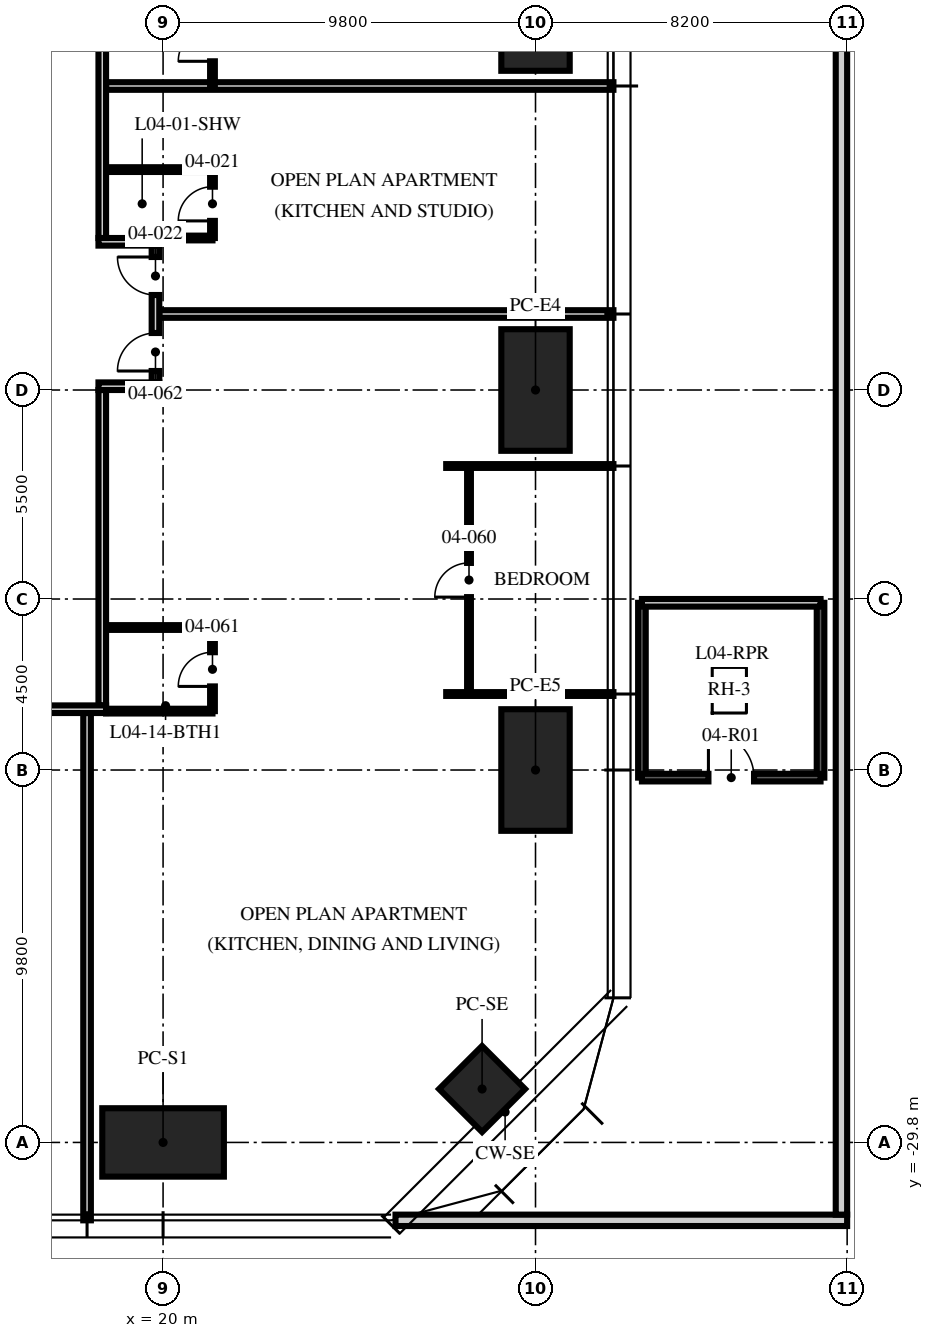
"""IFC4 building model, lengths in metres.
Left out: names, types, materials, properties, quantities, classifications, styles, units other than length and angle.
Written with IfcOpenShell. Run it as: python <this file> out.ifc"""

import sys

from ifc_helpers import new_model, si_unit, direction, frame, frame_2d, origin, origin_2d, place, context, subcontext, project, spatial, rectangle, hollow_rectangle, extrude, element, fill, save


model = new_model("IFC4")
c1 = context("Model", 3, precision=1e-05, world=origin(), true_north=direction((0.0, 1.0)))
c2 = subcontext(c1, "Body", "Model", "MODEL_VIEW")
j1 = project(units=[si_unit("LENGTHUNIT", "METRE"), si_unit("PLANEANGLEUNIT", "RADIAN")], contexts=[c1])
p1 = place(None, origin())
s1 = spatial("IfcSite", under=j1, at=p1, CompositionType="ELEMENT")
p2 = place(p1, origin())
s2 = spatial("IfcBuilding", under=s1, at=p2, CompositionType="ELEMENT")
p3 = place(p2, frame((0.0, 0.0, 21.0)))
s3 = spatial("IfcBuildingStorey", under=s2, at=p3, CompositionType="ELEMENT", Elevation=21.0)
for number, where, z_axis, x_axis in (
    (1, (29.8, 0.0, 0.0), (0.0, 0.0, 1.0), (0.0, 1.0, 0.0)),
    (2, (29.8, -10.0, 0.0), (0.0, 0.0, 1.0), (0.0, 1.0, 0.0)),
    (3, (29.8, -20.0, 0.0), (0.0, 0.0, 1.0), (0.0, 1.0, 0.0)),
    (4, (20.0, -29.8, 0.0), (0.0, 0.0, 1.0), (1.0, 0.0, 0.0)),
):
    element("IfcColumn", number, at=place(p3, frame(where, z_axis=z_axis, x_axis=x_axis)), inside=s3, PredefinedType="COLUMN", context=c2, shape_type="SweptSolid", body=[
        extrude(hollow_rectangle(XDim=3.2, YDim=1.8, WallThickness=0.2, at=origin_2d()), origin(), (0.0, 0.0, 1.0), 3.75),
    ])
p4 = place(p3, frame((28.394, -28.394, 0.0), z_axis=(0.0, 0.0, 1.0), x_axis=(0.707106781187, 0.707106781187, 0.0)))
e5 = element("IfcColumn", 5, at=p4, inside=s3, PredefinedType="COLUMN", context=c2, shape_type="SweptSolid", body=[
    extrude(hollow_rectangle(XDim=1.6, YDim=1.6, WallThickness=0.1, at=origin_2d()), origin(), (0.0, 0.0, 1.0), 3.75),
])
p5 = place(p3, frame((26.116, -31.85, 0.0), z_axis=(0.0, 0.0, 1.0), x_axis=(1.0, 0.0, 0.0)))
e6 = element("IfcWall", 6, at=p5, inside=s3, PredefinedType="PARAPET", context=c2, shape_type="SweptSolid", body=[
    extrude(rectangle(XDim=11.884, YDim=0.3, at=frame_2d((5.942, 0.0))), origin(), (0.0, 0.0, 1.0), 1.2),
])
p6 = place(p3, frame((37.85, -31.7, 0.0), z_axis=(0.0, 0.0, 1.0), x_axis=(0.0, 1.0, 0.0)))
e7 = element("IfcWall", 7, at=p6, inside=s3, PredefinedType="PARAPET", context=c2, shape_type="SweptSolid", body=[
    extrude(rectangle(XDim=75.4, YDim=0.3, at=frame_2d((37.7, 0.0))), origin(), (0.0, 0.0, 1.0), 1.2),
])
for number, where, z_axis, x_axis in (
    (8, (37.3, -20.2, 0.0), (0.0, 0.0, 1.0), (0.0, 1.0, 0.0)),
    (9, (32.6, -15.6, 0.0), (0.0, 0.0, 1.0), (0.0, -1.0, 0.0)),
):
    element("IfcWall", number, at=place(p3, frame(where, z_axis=z_axis, x_axis=x_axis)), inside=s3, PredefinedType="SOLIDWALL", context=c2, shape_type="SweptSolid", body=[
        extrude(rectangle(XDim=4.6, YDim=0.2, at=frame_2d((2.3, 0.0))), origin(), (0.0, 0.0, 1.0), 3.5),
    ])
p7 = place(p3, frame((19.9, -8.0, 0.0), z_axis=(0.0, 0.0, 1.0), x_axis=(1.0, 0.0, 0.0)))
e10 = element("IfcWall", 10, at=p7, inside=s3, PredefinedType="PARTITIONING", context=c2, shape_type="SweptSolid", body=[
    extrude(rectangle(XDim=11.95, YDim=0.2, at=frame_2d((5.975, 0.0))), origin(), (0.0, 0.0, 1.0), 2.71),
])
p8 = place(p3, frame((18.5, -2.0, 0.0), z_axis=(0.0, 0.0, 1.0), x_axis=(1.0, 0.0, 0.0)))
e11 = element("IfcWall", 11, at=p8, inside=s3, PredefinedType="PARTITIONING", context=c2, shape_type="SweptSolid", body=[
    extrude(rectangle(XDim=13.35, YDim=0.2, at=frame_2d((6.675, 0.0))), origin(), (0.0, 0.0, 1.0), 2.71),
])
p9 = place(p3, frame((18.0, -18.5, 0.0), z_axis=(0.0, 0.0, 1.0), x_axis=(0.0, -1.0, 0.0)))
e12 = element("IfcWall", 12, at=p9, inside=s3, PredefinedType="PARTITIONING", context=c2, shape_type="SweptSolid", body=[
    extrude(rectangle(XDim=13.35, YDim=0.2, at=frame_2d((6.675, 0.0))), origin(), (0.0, 0.0, 1.0), 2.3),
])
for number, where, z_axis, x_axis in (
    (13, (27.45, -18.0, 0.0), (0.0, 0.0, 1.0), (1.0, 0.0, 0.0)),
    (14, (27.45, -12.0, 0.0), (0.0, 0.0, 1.0), (1.0, 0.0, 0.0)),
):
    element("IfcWall", number, at=place(p3, frame(where, z_axis=z_axis, x_axis=x_axis)), inside=s3, PredefinedType="PARTITIONING", context=c2, shape_type="SweptSolid", body=[
        extrude(rectangle(XDim=4.4, YDim=0.1, at=frame_2d((2.2, 0.0))), origin(), (0.0, 0.0, 1.0), 2.71),
    ])
p10 = place(p3, frame((21.3, -6.0, 0.0), z_axis=(0.0, 0.0, 1.0), x_axis=(0.0, 1.0, 0.0)))
e15 = element("IfcWall", 15, at=p10, inside=s3, PredefinedType="PARTITIONING", context=c2, shape_type="SweptSolid", body=[
    extrude(rectangle(XDim=1.8, YDim=0.125, at=frame_2d((0.9, 0.0))), origin(), (0.0, 0.0, 1.0), 2.61),
])
p11 = place(p10, frame((0.45, 0.0, 0.0)))
e16 = element("IfcOpeningElement", 16, at=p11, cuts=e15, PredefinedType="OPENING", context=c2, shape_type="SweptSolid", body=[
    extrude(rectangle(XDim=0.9, YDim=2.1, at=frame_2d((0.45, 1.05))), frame((0.0, 0.073, 0.0), z_axis=(0.0, -1.0, 0.0), x_axis=(1.0, 0.0, 0.0)), (0.0, 0.0, 1.0), 0.145),
])
p12 = place(p3, frame((19.97, -6.0, 0.0), z_axis=(0.0, 0.0, 1.0), x_axis=(1.0, 0.0, 0.0)))
e17 = element("IfcWall", 17, at=p12, inside=s3, PredefinedType="PARTITIONING", context=c2, shape_type="SweptSolid", body=[
    extrude(rectangle(XDim=1.33, YDim=0.125, at=frame_2d((0.665, 0.0))), origin(), (0.0, 0.0, 1.0), 3.5),
])
p13 = place(p3, frame((18.5, -4.2, 0.0), z_axis=(0.0, 0.0, 1.0), x_axis=(1.0, 0.0, 0.0)))
e18 = element("IfcWall", 18, at=p13, inside=s3, PredefinedType="PARTITIONING", context=c2, shape_type="SweptSolid", body=[
    extrude(rectangle(XDim=2.8, YDim=0.125, at=frame_2d((1.4, 0.0))), origin(), (0.0, 0.0, 1.0), 3.5),
])
p14 = place(p3, frame((21.3, -2.0, 0.0), z_axis=(0.0, 0.0, 1.0), x_axis=(0.0, 1.0, 0.0)))
e19 = element("IfcWall", 19, at=p14, inside=s3, PredefinedType="PARTITIONING", context=c2, shape_type="SweptSolid", body=[
    extrude(rectangle(XDim=4.4, YDim=0.125, at=frame_2d((2.2, 0.0))), origin(), (0.0, 0.0, 1.0), 2.492),
])
p15 = place(p14, frame((0.65, 0.0, 0.0)))
e20 = element("IfcOpeningElement", 20, at=p15, cuts=e19, PredefinedType="OPENING", context=c2, shape_type="SweptSolid", body=[
    extrude(rectangle(XDim=0.9, YDim=2.1, at=frame_2d((0.45, 1.05))), frame((0.0, 0.073, 0.0), z_axis=(0.0, -1.0, 0.0), x_axis=(1.0, 0.0, 0.0)), (0.0, 0.0, 1.0), 0.145),
])
p16 = place(p14, frame((2.85, 0.0, 0.0)))
e21 = element("IfcOpeningElement", 21, at=p16, cuts=e19, PredefinedType="OPENING", context=c2, shape_type="SweptSolid", body=[
    extrude(rectangle(XDim=0.9, YDim=2.1, at=frame_2d((0.45, 1.05))), frame((0.0, 0.073, 0.0), z_axis=(0.0, -1.0, 0.0), x_axis=(1.0, 0.0, 0.0)), (0.0, 0.0, 1.0), 0.145),
])
p17 = place(p3, frame((28.05, -18.0, 0.0), z_axis=(0.0, 0.0, 1.0), x_axis=(0.0, 1.0, 0.0)))
e22 = element("IfcWall", 22, at=p17, inside=s3, PredefinedType="PARTITIONING", context=c2, shape_type="SweptSolid", body=[
    extrude(rectangle(XDim=6.0, YDim=0.1, at=frame_2d((3.0, 0.0))), origin(), (0.0, 0.0, 1.0), 2.61),
])
p18 = place(p17, frame((2.55, 0.0, 0.0)))
e23 = element("IfcOpeningElement", 23, at=p18, cuts=e22, PredefinedType="OPENING", context=c2, shape_type="SweptSolid", body=[
    extrude(rectangle(XDim=0.9, YDim=2.1, at=frame_2d((0.45, 1.05))), frame((0.0, 0.06, 0.0), z_axis=(0.0, -1.0, 0.0), x_axis=(1.0, 0.0, 0.0)), (0.0, 0.0, 1.0), 0.12),
])
p19 = place(p3, frame((21.3, -18.45, 0.0), z_axis=(0.0, 0.0, 1.0), x_axis=(0.0, 1.0, 0.0)))
e24 = element("IfcWall", 24, at=p19, inside=s3, PredefinedType="PARTITIONING", context=c2, shape_type="SweptSolid", body=[
    extrude(rectangle(XDim=2.2, YDim=0.125, at=frame_2d((1.1, 0.0))), origin(), (0.0, 0.0, 1.0), 3.5),
])
p20 = place(p19, frame((0.65, 0.0, 0.0)))
e25 = element("IfcOpeningElement", 25, at=p20, cuts=e24, PredefinedType="OPENING", context=c2, shape_type="SweptSolid", body=[
    extrude(rectangle(XDim=0.9, YDim=2.1, at=frame_2d((0.45, 1.05))), frame((0.0, 0.073, 0.0), z_axis=(0.0, -1.0, 0.0), x_axis=(1.0, 0.0, 0.0)), (0.0, 0.0, 1.0), 0.145),
])
p21 = place(p3, frame((18.5, -18.45, 0.0), z_axis=(0.0, 0.0, 1.0), x_axis=(1.0, 0.0, 0.0)))
e26 = element("IfcWall", 26, at=p21, inside=s3, PredefinedType="PARTITIONING", context=c2, shape_type="SweptSolid", body=[
    extrude(rectangle(XDim=2.8, YDim=0.125, at=frame_2d((1.4, 0.0))), origin(), (0.0, 0.0, 1.0), 2.3),
])
p22 = place(p3, frame((18.5, -16.25, 0.0), z_axis=(0.0, 0.0, 1.0), x_axis=(1.0, 0.0, 0.0)))
e27 = element("IfcWall", 27, at=p22, inside=s3, PredefinedType="PARTITIONING", context=c2, shape_type="SweptSolid", body=[
    extrude(rectangle(XDim=2.8, YDim=0.125, at=frame_2d((1.4, 0.0))), origin(), (0.0, 0.0, 1.0), 3.5),
])
p23 = place(p3, frame((18.4, -18.3, 0.0), z_axis=(0.0, 0.0, 1.0), x_axis=(0.0, 1.0, 0.0)))
e28 = element("IfcWall", 28, at=p23, inside=s3, PredefinedType="PARTITIONING", context=c2, shape_type="SweptSolid", body=[
    extrude(rectangle(XDim=8.3, YDim=0.2, at=frame_2d((4.15, 0.0))), origin(), (0.0, 0.0, 1.0), 2.3),
])
p24 = place(p3, frame((18.3, -9.9, 0.0), z_axis=(0.0, 0.0, 1.0), x_axis=(1.0, 0.0, 0.0)))
e29 = element("IfcWall", 29, at=p24, inside=s3, PredefinedType="PARTITIONING", context=c2, shape_type="SweptSolid", body=[
    extrude(rectangle(XDim=1.6, YDim=0.2, at=frame_2d((0.8, 0.0))), origin(), (0.0, 0.0, 1.0), 2.492),
])
p25 = place(p3, frame((18.3, -6.1, 0.0), z_axis=(0.0, 0.0, 1.0), x_axis=(1.0, 0.0, 0.0)))
e30 = element("IfcWall", 30, at=p25, inside=s3, PredefinedType="PARTITIONING", context=c2, shape_type="SweptSolid", body=[
    extrude(rectangle(XDim=1.6, YDim=0.2, at=frame_2d((0.8, 0.0))), origin(), (0.0, 0.0, 1.0), 3.5),
])
p26 = place(p3, frame((19.8, -9.8, 0.0), z_axis=(0.0, 0.0, 1.0), x_axis=(0.0, 1.0, 0.0)))
e31 = element("IfcWall", 31, at=p26, inside=s3, PredefinedType="PARTITIONING", context=c2, shape_type="SweptSolid", body=[
    extrude(rectangle(XDim=3.6, YDim=0.2, at=frame_2d((1.8, 0.0))), origin(), (0.0, 0.0, 1.0), 3.5),
])
p27 = place(p26, frame((2.3, 0.0, 0.0)))
e32 = element("IfcOpeningElement", 32, at=p27, cuts=e31, PredefinedType="OPENING", context=c2, shape_type="SweptSolid", body=[
    extrude(rectangle(XDim=1.0, YDim=2.2, at=frame_2d((0.5, 1.1))), frame((0.0, 0.11, 0.0), z_axis=(0.0, -1.0, 0.0), x_axis=(1.0, 0.0, 0.0)), (0.0, 0.0, 1.0), 0.22),
])
p28 = place(p26, frame((0.3, 0.0, 0.0)))
e33 = element("IfcOpeningElement", 33, at=p28, cuts=e31, PredefinedType="OPENING", context=c2, shape_type="SweptSolid", body=[
    extrude(rectangle(XDim=1.0, YDim=2.2, at=frame_2d((0.5, 1.1))), frame((0.0, 0.11, 0.0), z_axis=(0.0, -1.0, 0.0), x_axis=(1.0, 0.0, 0.0)), (0.0, 0.0, 1.0), 0.22),
])
p29 = place(p3, frame((18.4, -6.0, 0.0), z_axis=(0.0, 0.0, 1.0), x_axis=(0.0, 1.0, 0.0)))
e34 = element("IfcWall", 34, at=p29, inside=s3, PredefinedType="PARTITIONING", context=c2, shape_type="SweptSolid", body=[
    extrude(rectangle(XDim=24.3, YDim=0.2, at=frame_2d((12.15, 0.0))), origin(), (0.0, 0.0, 1.0), 2.3),
])
p30 = place(p3, frame((18.5, -18.4, 0.0), z_axis=(0.0, 0.0, 1.0), x_axis=(-1.0, 0.0, 0.0)))
e35 = element("IfcWall", 35, at=p30, inside=s3, PredefinedType="PARTITIONING", context=c2, shape_type="SweptSolid", body=[
    extrude(rectangle(XDim=4.5, YDim=0.2, at=frame_2d((2.25, 0.0))), origin(), (0.0, 0.0, 1.0), 2.3),
])
p31 = place(p3, frame((32.6, -20.2, 0.0), z_axis=(0.0, 0.0, 1.0), x_axis=(1.0, 0.0, 0.0)))
e36 = element("IfcWall", 36, at=p31, inside=s3, PredefinedType="SOLIDWALL", context=c2, shape_type="SweptSolid", body=[
    extrude(rectangle(XDim=4.7, YDim=0.2, at=frame_2d((2.35, 0.0))), origin(), (0.0, 0.0, 1.0), 3.5),
])
p32 = place(p31, frame((1.75, 0.0, 0.0)))
e37 = element("IfcOpeningElement", 37, at=p32, cuts=e36, PredefinedType="OPENING", context=c2, shape_type="SweptSolid", body=[
    extrude(rectangle(XDim=1.2, YDim=2.1, at=frame_2d((0.6, 1.05))), frame((0.0, 0.11, 0.0), z_axis=(0.0, -1.0, 0.0), x_axis=(1.0, 0.0, 0.0)), (0.0, 0.0, 1.0), 0.22),
])
p33 = place(p3, frame((37.3, -15.6, 0.0), z_axis=(0.0, 0.0, 1.0), x_axis=(-1.0, 0.0, 0.0)))
e38 = element("IfcWall", 38, at=p33, inside=s3, PredefinedType="SOLIDWALL", context=c2, shape_type="SweptSolid", body=[
    extrude(rectangle(XDim=4.7, YDim=0.2, at=frame_2d((2.35, 0.0))), origin(), (0.0, 0.0, 1.0), 3.5),
])
p34 = place(p3, frame((0.0, 0.0, -0.25)))
p35 = place(p34, frame((34.9, -17.9, 0.0)))
p36 = place(p35, frame((0.0, 0.0, 0.25)))
e39 = element("IfcDoor", 39, at=p36, inside=s3, OperationType="SINGLE_SWING_LEFT", PredefinedType="TRAPDOOR", context=c2, shape_type="SweptSolid", body=[
    extrude(rectangle(XDim=0.9, YDim=1.2, at=origin_2d()), origin(), (0.0, 0.0, 1.0), 0.05),
])
p37 = place(p32, origin())
e40 = element("IfcDoor", 40, at=p37, inside=s3, OperationType="SINGLE_SWING_LEFT", PredefinedType="DOOR", context=c2, shape_type="SweptSolid", body=[
    extrude(rectangle(XDim=1.2, YDim=2.1, at=frame_2d((0.6, 1.05))), frame((0.0, 0.025, 0.0), z_axis=(0.0, -1.0, 0.0), x_axis=(1.0, 0.0, 0.0)), (0.0, 0.0, 1.0), 0.05),
])
fill(e37, e40)
p38 = place(p11, origin())
e41 = element("IfcDoor", 41, at=p38, inside=s3, OperationType="SINGLE_SWING_LEFT", PredefinedType="DOOR", context=c2, shape_type="SweptSolid", body=[
    extrude(rectangle(XDim=0.9, YDim=2.1, at=frame_2d((0.45, 1.05))), frame((0.0, 0.025, 0.0), z_axis=(0.0, -1.0, 0.0), x_axis=(1.0, 0.0, 0.0)), (0.0, 0.0, 1.0), 0.05),
])
fill(e16, e41)
p39 = place(p27, origin())
e42 = element("IfcDoor", 42, at=p39, inside=s3, OperationType="SINGLE_SWING_RIGHT", PredefinedType="DOOR", context=c2, shape_type="SweptSolid", body=[
    extrude(rectangle(XDim=1.0, YDim=2.2, at=frame_2d((0.5, 1.1))), frame((0.0, 0.025, 0.0), z_axis=(0.0, -1.0, 0.0), x_axis=(1.0, 0.0, 0.0)), (0.0, 0.0, 1.0), 0.05),
])
fill(e32, e42)
p40 = place(p15, origin())
e43 = element("IfcDoor", 43, at=p40, inside=s3, OperationType="SINGLE_SWING_LEFT", PredefinedType="DOOR", context=c2, shape_type="SweptSolid", body=[
    extrude(rectangle(XDim=0.9, YDim=2.1, at=frame_2d((0.45, 1.05))), frame((0.0, 0.025, 0.0), z_axis=(0.0, -1.0, 0.0), x_axis=(1.0, 0.0, 0.0)), (0.0, 0.0, 1.0), 0.05),
])
fill(e20, e43)
p41 = place(p18, origin())
e44 = element("IfcDoor", 44, at=p41, inside=s3, OperationType="SINGLE_SWING_LEFT", PredefinedType="DOOR", context=c2, shape_type="SweptSolid", body=[
    extrude(rectangle(XDim=0.9, YDim=2.1, at=frame_2d((0.45, 1.05))), frame((0.0, 0.025, 0.0), z_axis=(0.0, -1.0, 0.0), x_axis=(1.0, 0.0, 0.0)), (0.0, 0.0, 1.0), 0.05),
])
fill(e23, e44)
p42 = place(p20, origin())
e45 = element("IfcDoor", 45, at=p42, inside=s3, OperationType="SINGLE_SWING_LEFT", PredefinedType="DOOR", context=c2, shape_type="SweptSolid", body=[
    extrude(rectangle(XDim=0.9, YDim=2.1, at=frame_2d((0.45, 1.05))), frame((0.0, 0.025, 0.0), z_axis=(0.0, -1.0, 0.0), x_axis=(1.0, 0.0, 0.0)), (0.0, 0.0, 1.0), 0.05),
])
fill(e25, e45)
p43 = place(p28, origin())
e46 = element("IfcDoor", 46, at=p43, inside=s3, OperationType="SINGLE_SWING_LEFT", PredefinedType="DOOR", context=c2, shape_type="SweptSolid", body=[
    extrude(rectangle(XDim=1.0, YDim=2.2, at=frame_2d((0.5, 1.1))), frame((0.0, 0.025, 0.0), z_axis=(0.0, -1.0, 0.0), x_axis=(1.0, 0.0, 0.0)), (0.0, 0.0, 1.0), 0.05),
])
fill(e33, e46)
save(model, sys.argv[1])
